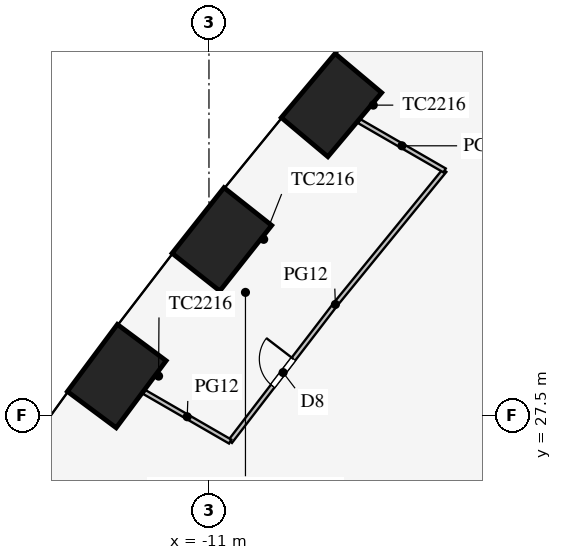
"""IFC4 building model, lengths in metres.
Left out: names, types, materials, properties, quantities, classifications, styles, units other than length and angle.
Written with IfcOpenShell. Run it as: python <this file> out.ifc"""

import sys

from ifc_helpers import new_model, si_unit, direction, frame, frame_2d, origin, origin_2d, place, context, subcontext, project, spatial, rectangle, extrude, element, fill, save


model = new_model("IFC4")
c1 = context("Model", 3, precision=1e-05, world=origin(), true_north=direction((0.0, 1.0)))
c2 = subcontext(c1, "Body", "Model", "MODEL_VIEW")
j1 = project(units=[si_unit("LENGTHUNIT", "METRE"), si_unit("PLANEANGLEUNIT", "RADIAN")], contexts=[c1])
p1 = place(None, origin())
s1 = spatial("IfcSite", under=j1, at=p1, CompositionType="ELEMENT")
p2 = place(p1, origin())
s2 = spatial("IfcBuilding", under=s1, at=p2, CompositionType="ELEMENT")
p3 = place(p2, frame((0.0, 0.0, 83.7)))
s3 = spatial("IfcBuildingStorey", under=s2, at=p3, CompositionType="ELEMENT", Elevation=83.7)
for number, where, z_axis, x_axis in (
    (1, (-7.776, 35.667, 0.0), (0.0, 0.0, 1.0), (-0.643, -0.766, 0.0)),
    (2, (-10.66, 32.135, 0.0), (0.0, 0.0, 1.0), (-0.62, -0.784, 0.0)),
    (3, (-13.426, 28.536, 0.0), (0.0, 0.0, 1.0), (-0.597, -0.802, 0.0)),
    (4, (-16.076, 24.87, 0.0), (0.0, 0.0, 1.0), (-0.574, -0.819, 0.0)),
):
    element("IfcColumn", number, at=place(p3, frame(where, z_axis=z_axis, x_axis=x_axis)), inside=s3, PredefinedType="COLUMN", context=c2, shape_type="SweptSolid", body=[
        extrude(rectangle(XDim=2.2, YDim=1.6, at=origin_2d()), origin(), (0.0, 0.0, 1.0), 4.2),
    ])
p4 = place(p3, frame((-7.679, 30.415, 0.0), z_axis=(0.0, 0.0, 1.0), x_axis=(-0.608818785139, -0.79330932609, 0.0)))
e5 = element("IfcWall", 5, at=p4, inside=s3, PredefinedType="PARTITIONING", context=c2, shape_type="SweptSolid", body=[
    extrude(rectangle(XDim=4.539, YDim=0.12, at=frame_2d((2.27, 0.0))), origin(), (0.0, 0.0, 1.0), 2.9),
])
p5 = place(p4, frame((1.8, 0.0, 0.15)))
e6 = element("IfcOpeningElement", 6, at=p5, cuts=e5, PredefinedType="OPENING", context=c2, shape_type="SweptSolid", body=[
    extrude(rectangle(XDim=0.9, YDim=2.1, at=frame_2d((0.45, 1.05))), frame((0.0, 0.07, 0.0), z_axis=(0.0, -1.0, 0.0), x_axis=(1.0, 0.0, 0.0)), (0.0, 0.0, 1.0), 0.14),
])
p6 = place(p3, frame((-4.799, 33.948, 0.0), z_axis=(0.0, 0.0, 1.0), x_axis=(-0.631833879056, -0.775103831288, 0.0)))
e7 = element("IfcWall", 7, at=p6, inside=s3, PredefinedType="PARTITIONING", context=c2, shape_type="SweptSolid", body=[
    extrude(rectangle(XDim=4.558, YDim=0.12, at=frame_2d((2.279, 0.0))), origin(), (0.0, 0.0, 1.0), 2.9),
])
p7 = place(p3, frame((-10.443, 26.814, 0.0), z_axis=(0.0, 0.0, 1.0), x_axis=(-0.866017274468, 0.500014080125, 0.0)))
e8 = element("IfcWall", 8, at=p7, inside=s3, PredefinedType="PARTITIONING", context=c2, shape_type="SweptSolid", body=[
    extrude(rectangle(XDim=2.609, YDim=0.12, at=frame_2d((1.304, 0.0))), origin(), (0.0, 0.0, 1.0), 2.4),
])
p8 = place(p3, frame((-4.799, 33.948, 0.0), z_axis=(0.0, 0.0, 1.0), x_axis=(-0.866005410122, 0.500034628441, 0.0)))
e9 = element("IfcWall", 9, at=p8, inside=s3, PredefinedType="PARTITIONING", context=c2, shape_type="SweptSolid", body=[
    extrude(rectangle(XDim=2.595, YDim=0.12, at=frame_2d((1.297, 0.0))), origin(), (0.0, 0.0, 1.0), 2.9),
])
p9 = place(p5, frame((0.9, 0.0, 0.0), z_axis=(0.0, 0.0, 1.0), x_axis=(-1.0, 0.0, 0.0)))
e10 = element("IfcDoor", 10, at=p9, inside=s3, OperationType="SINGLE_SWING_RIGHT", PredefinedType="DOOR", context=c2, shape_type="SweptSolid", body=[
    extrude(rectangle(XDim=0.9, YDim=2.1, at=frame_2d((0.45, 1.05))), frame((0.0, 0.025, 0.0), z_axis=(0.0, -1.0, 0.0), x_axis=(1.0, 0.0, 0.0)), (0.0, 0.0, 1.0), 0.05),
])
fill(e6, e10)
save(model, sys.argv[1])
